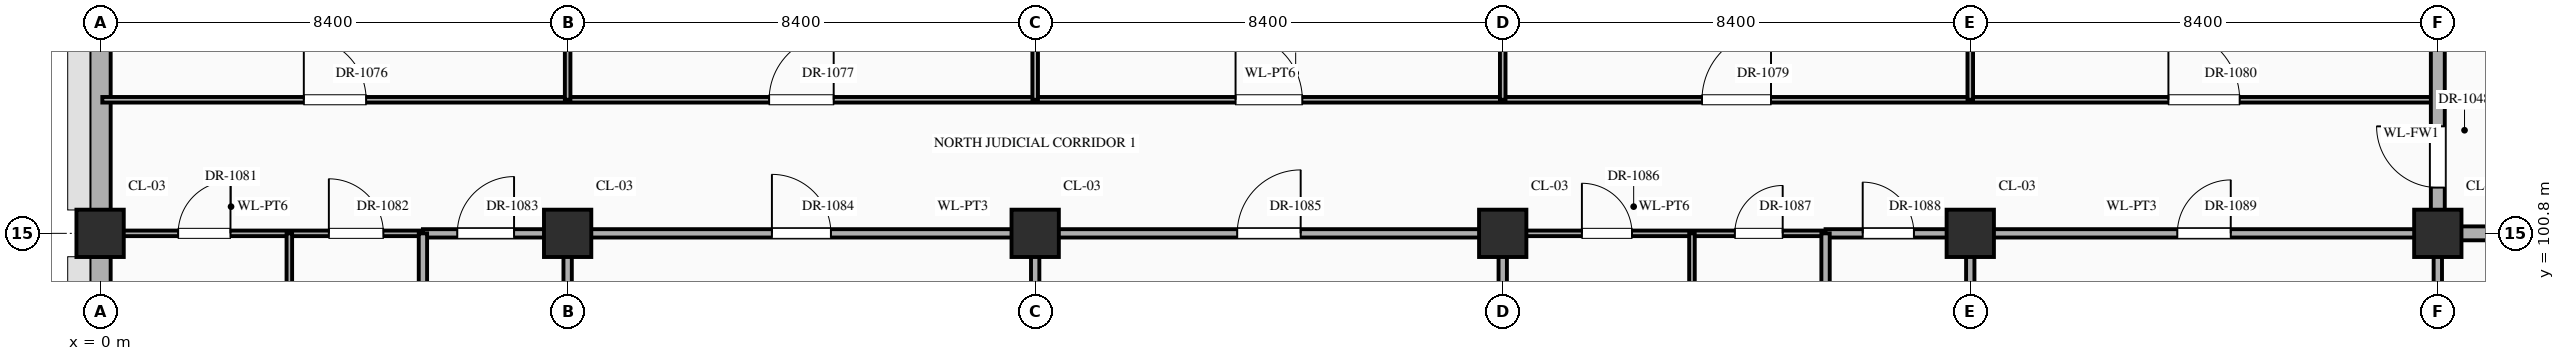
"""IFC4 building model, lengths in metres.
Left out: names, types, materials, properties, quantities, classifications, styles, units other than length and angle.
Written with IfcOpenShell. Run it as: python <this file> out.ifc"""

import sys

from ifc_helpers import new_model, si_unit, direction, frame, frame_2d, origin, origin_2d, place, context, subcontext, project, spatial, rectangle, extrude, element, fill, save


model = new_model("IFC4")
c1 = context("Model", 3, precision=1e-05, world=origin(), true_north=direction((0.0, 1.0)))
c2 = subcontext(c1, "Body", "Model", "MODEL_VIEW")
j1 = project(units=[si_unit("LENGTHUNIT", "METRE"), si_unit("PLANEANGLEUNIT", "RADIAN")], contexts=[c1])
p1 = place(None, origin())
s1 = spatial("IfcSite", under=j1, at=p1, CompositionType="ELEMENT")
p2 = place(p1, origin())
s2 = spatial("IfcBuilding", under=s1, at=p2, CompositionType="ELEMENT")
p3 = place(p2, frame((0.0, 0.0, 5.4)))
s3 = spatial("IfcBuildingStorey", under=s2, at=p3, CompositionType="ELEMENT", Elevation=5.4)
for number, where, z_axis, x_axis in (
    (1, (0.0, 100.8, 0.0), (0.0, 0.0, 1.0), (1.0, 0.0, 0.0)),
    (2, (8.4, 100.8, 0.0), (0.0, 0.0, 1.0), (1.0, 0.0, 0.0)),
    (3, (16.8, 100.8, 0.0), (0.0, 0.0, 1.0), (1.0, 0.0, 0.0)),
    (4, (25.2, 100.8, 0.0), (0.0, 0.0, 1.0), (1.0, 0.0, 0.0)),
    (5, (33.6, 100.8, 0.0), (0.0, 0.0, 1.0), (1.0, 0.0, 0.0)),
    (6, (42.0, 100.8, 0.0), (0.0, 0.0, 1.0), (1.0, 0.0, 0.0)),
):
    element("IfcColumn", number, at=place(p3, frame(where, z_axis=z_axis, x_axis=x_axis)), inside=s3, PredefinedType="COLUMN", context=c2, shape_type="SweptSolid", body=[
        extrude(rectangle(XDim=0.85, YDim=0.85, at=origin_2d()), origin(), (0.0, 0.0, 1.0), 5.4),
    ])
p4 = place(p3, frame((0.0, 94.02, 0.0), z_axis=(0.0, 0.0, 1.0), x_axis=(0.0, 1.0, 0.0)))
e7 = element("IfcWall", 7, at=p4, inside=s3, PredefinedType="STANDARD", context=c2, shape_type="SweptSolid", body=[
    extrude(rectangle(XDim=6.36, YDim=0.38, at=frame_2d((3.18, 0.0))), origin(), (0.0, 0.0, 1.0), 4.47),
])
p5 = place(p4, frame((3.705, 0.0, 0.85)))
e8 = element("IfcOpeningElement", 8, at=p5, cuts=e7, PredefinedType="OPENING", context=c2, shape_type="SweptSolid", body=[
    extrude(rectangle(XDim=1.55, YDim=1.74, at=frame_2d((0.775, 0.87))), frame((0.0, 0.202, 0.0), z_axis=(0.0, -1.0, 0.0), x_axis=(1.0, 0.0, 0.0)), (0.0, 0.0, 1.0), 0.404),
])
p6 = place(p3, frame((0.0, 101.22, 0.0), z_axis=(0.0, 0.0, 1.0), x_axis=(0.0, 1.0, 0.0)))
e9 = element("IfcWall", 9, at=p6, inside=s3, PredefinedType="STANDARD", context=c2, shape_type="SweptSolid", body=[
    extrude(rectangle(XDim=6.36, YDim=0.38, at=frame_2d((3.18, 0.0))), origin(), (0.0, 0.0, 1.0), 4.47),
])
p7 = place(p6, frame((3.705, 0.0, 0.85)))
e10 = element("IfcOpeningElement", 10, at=p7, cuts=e9, PredefinedType="OPENING", context=c2, shape_type="SweptSolid", body=[
    extrude(rectangle(XDim=1.55, YDim=1.92, at=frame_2d((0.775, 0.96))), frame((0.0, 0.202, 0.0), z_axis=(0.0, -1.0, 0.0), x_axis=(1.0, 0.0, 0.0)), (0.0, 0.0, 1.0), 0.404),
])
p8 = place(p3, frame((0.04, 100.8, 0.0), z_axis=(0.0, 0.0, 1.0), x_axis=(1.0, 0.0, 0.0)))
e11 = element("IfcWall", 11, at=p8, inside=s3, PredefinedType="STANDARD", context=c2, shape_type="SweptSolid", body=[
    extrude(rectangle(XDim=5.76, YDim=0.1, at=frame_2d((2.88, 0.0))), origin(), (0.0, 0.0, 1.0), 4.27),
])
p9 = place(p8, frame((1.363, 0.0, 0.0)))
e12 = element("IfcOpeningElement", 12, at=p9, cuts=e11, PredefinedType="OPENING", context=c2, shape_type="SweptSolid", body=[
    extrude(rectangle(XDim=0.94, YDim=2.3, at=frame_2d((0.47, 1.15))), frame((0.0, 0.062, 0.0), z_axis=(0.0, -1.0, 0.0), x_axis=(1.0, 0.0, 0.0)), (0.0, 0.0, 1.0), 0.124),
])
p10 = place(p8, frame((4.07, 0.0, 0.0)))
e13 = element("IfcOpeningElement", 13, at=p10, cuts=e11, PredefinedType="OPENING", context=c2, shape_type="SweptSolid", body=[
    extrude(rectangle(XDim=0.98, YDim=2.35, at=frame_2d((0.49, 1.175))), frame((0.0, 0.062, 0.0), z_axis=(0.0, -1.0, 0.0), x_axis=(1.0, 0.0, 0.0)), (0.0, 0.0, 1.0), 0.124),
])
p11 = place(p3, frame((5.8, 100.8, 0.0), z_axis=(0.0, 0.0, 1.0), x_axis=(1.0, 0.0, 0.0)))
e14 = element("IfcWall", 14, at=p11, inside=s3, PredefinedType="STANDARD", context=c2, shape_type="SweptSolid", body=[
    extrude(rectangle(XDim=19.4, YDim=0.15, at=frame_2d((9.7, 0.0))), origin(), (0.0, 0.0, 1.0), 4.27),
])
p12 = place(p11, frame((0.617, 0.0, 0.0)))
e15 = element("IfcOpeningElement", 15, at=p12, cuts=e14, PredefinedType="OPENING", context=c2, shape_type="SweptSolid", body=[
    extrude(rectangle(XDim=1.02, YDim=2.4, at=frame_2d((0.51, 1.2))), frame((0.0, 0.087, 0.0), z_axis=(0.0, -1.0, 0.0), x_axis=(1.0, 0.0, 0.0)), (0.0, 0.0, 1.0), 0.174),
])
p13 = place(p11, frame((6.27, 0.0, 0.0)))
e16 = element("IfcOpeningElement", 16, at=p13, cuts=e14, PredefinedType="OPENING", context=c2, shape_type="SweptSolid", body=[
    extrude(rectangle(XDim=1.06, YDim=2.4, at=frame_2d((0.53, 1.2))), frame((0.0, 0.087, 0.0), z_axis=(0.0, -1.0, 0.0), x_axis=(1.0, 0.0, 0.0)), (0.0, 0.0, 1.0), 0.174),
])
p14 = place(p11, frame((14.63, 0.0, 0.0)))
e17 = element("IfcOpeningElement", 17, at=p14, cuts=e14, PredefinedType="OPENING", context=c2, shape_type="SweptSolid", body=[
    extrude(rectangle(XDim=1.14, YDim=2.4, at=frame_2d((0.57, 1.2))), frame((0.0, 0.087, 0.0), z_axis=(0.0, -1.0, 0.0), x_axis=(1.0, 0.0, 0.0)), (0.0, 0.0, 1.0), 0.174),
])
p15 = place(p3, frame((25.2, 100.8, 0.0), z_axis=(0.0, 0.0, 1.0), x_axis=(1.0, 0.0, 0.0)))
e18 = element("IfcWall", 18, at=p15, inside=s3, PredefinedType="STANDARD", context=c2, shape_type="SweptSolid", body=[
    extrude(rectangle(XDim=5.8, YDim=0.1, at=frame_2d((2.9, 0.0))), origin(), (0.0, 0.0, 1.0), 4.27),
])
p16 = place(p15, frame((1.423, 0.0, 0.0)))
e19 = element("IfcOpeningElement", 19, at=p16, cuts=e18, PredefinedType="OPENING", context=c2, shape_type="SweptSolid", body=[
    extrude(rectangle(XDim=0.9, YDim=2.15, at=frame_2d((0.45, 1.075))), frame((0.0, 0.062, 0.0), z_axis=(0.0, -1.0, 0.0), x_axis=(1.0, 0.0, 0.0)), (0.0, 0.0, 1.0), 0.124),
])
p17 = place(p15, frame((4.17, 0.0, 0.0)))
e20 = element("IfcOpeningElement", 20, at=p17, cuts=e18, PredefinedType="OPENING", context=c2, shape_type="SweptSolid", body=[
    extrude(rectangle(XDim=0.86, YDim=2.1, at=frame_2d((0.43, 1.05))), frame((0.0, 0.062, 0.0), z_axis=(0.0, -1.0, 0.0), x_axis=(1.0, 0.0, 0.0)), (0.0, 0.0, 1.0), 0.124),
])
p18 = place(p3, frame((31.0, 100.8, 0.0), z_axis=(0.0, 0.0, 1.0), x_axis=(1.0, 0.0, 0.0)))
e21 = element("IfcWall", 21, at=p18, inside=s3, PredefinedType="STANDARD", context=c2, shape_type="SweptSolid", body=[
    extrude(rectangle(XDim=11.0, YDim=0.15, at=frame_2d((5.5, 0.0))), origin(), (0.0, 0.0, 1.0), 4.27),
])
p19 = place(p18, frame((0.667, 0.0, 0.0)))
e22 = element("IfcOpeningElement", 22, at=p19, cuts=e21, PredefinedType="OPENING", context=c2, shape_type="SweptSolid", body=[
    extrude(rectangle(XDim=0.92, YDim=2.15, at=frame_2d((0.46, 1.075))), frame((0.0, 0.087, 0.0), z_axis=(0.0, -1.0, 0.0), x_axis=(1.0, 0.0, 0.0)), (0.0, 0.0, 1.0), 0.174),
])
p20 = place(p18, frame((6.32, 0.0, 0.0)))
e23 = element("IfcOpeningElement", 23, at=p20, cuts=e21, PredefinedType="OPENING", context=c2, shape_type="SweptSolid", body=[
    extrude(rectangle(XDim=0.96, YDim=2.2, at=frame_2d((0.48, 1.1))), frame((0.0, 0.087, 0.0), z_axis=(0.0, -1.0, 0.0), x_axis=(1.0, 0.0, 0.0)), (0.0, 0.0, 1.0), 0.174),
])
p21 = place(p3, frame((42.0, 100.8, 0.0), z_axis=(0.0, 0.0, 1.0), x_axis=(1.0, 0.0, 0.0)))
e24 = element("IfcWall", 24, at=p21, inside=s3, PredefinedType="STANDARD", context=c2, shape_type="SweptSolid", body=[
    extrude(rectangle(XDim=4.2, YDim=0.25, at=frame_2d((2.1, 0.0))), origin(), (0.0, 0.0, 1.0), 4.27),
])
p22 = place(p3, frame((0.04, 103.2, 0.0), z_axis=(0.0, 0.0, 1.0), x_axis=(1.0, 0.0, 0.0)))
e25 = element("IfcWall", 25, at=p22, inside=s3, PredefinedType="STANDARD", context=c2, shape_type="SweptSolid", body=[
    extrude(rectangle(XDim=41.96, YDim=0.1, at=frame_2d((20.98, 0.0))), origin(), (0.0, 0.0, 1.0), 5.12),
])
p23 = place(p22, frame((3.62, 0.0, 0.0)))
e26 = element("IfcOpeningElement", 26, at=p23, cuts=e25, PredefinedType="OPENING", context=c2, shape_type="SweptSolid", body=[
    extrude(rectangle(XDim=1.12, YDim=2.25, at=frame_2d((0.56, 1.125))), frame((0.0, 0.062, 0.0), z_axis=(0.0, -1.0, 0.0), x_axis=(1.0, 0.0, 0.0)), (0.0, 0.0, 1.0), 0.124),
])
p24 = place(p22, frame((11.98, 0.0, 0.0)))
e27 = element("IfcOpeningElement", 27, at=p24, cuts=e25, PredefinedType="OPENING", context=c2, shape_type="SweptSolid", body=[
    extrude(rectangle(XDim=1.16, YDim=2.3, at=frame_2d((0.58, 1.15))), frame((0.0, 0.062, 0.0), z_axis=(0.0, -1.0, 0.0), x_axis=(1.0, 0.0, 0.0)), (0.0, 0.0, 1.0), 0.124),
])
p25 = place(p22, frame((20.36, 0.0, 0.0)))
e28 = element("IfcOpeningElement", 28, at=p25, cuts=e25, PredefinedType="OPENING", context=c2, shape_type="SweptSolid", body=[
    extrude(rectangle(XDim=1.2, YDim=2.35, at=frame_2d((0.6, 1.175))), frame((0.0, 0.062, 0.0), z_axis=(0.0, -1.0, 0.0), x_axis=(1.0, 0.0, 0.0)), (0.0, 0.0, 1.0), 0.124),
])
p26 = place(p22, frame((28.74, 0.0, 0.0)))
e29 = element("IfcOpeningElement", 29, at=p26, cuts=e25, PredefinedType="OPENING", context=c2, shape_type="SweptSolid", body=[
    extrude(rectangle(XDim=1.24, YDim=2.3, at=frame_2d((0.62, 1.15))), frame((0.0, 0.062, 0.0), z_axis=(0.0, -1.0, 0.0), x_axis=(1.0, 0.0, 0.0)), (0.0, 0.0, 1.0), 0.124),
])
p27 = place(p22, frame((37.12, 0.0, 0.0)))
e30 = element("IfcOpeningElement", 30, at=p27, cuts=e25, PredefinedType="OPENING", context=c2, shape_type="SweptSolid", body=[
    extrude(rectangle(XDim=1.28, YDim=2.35, at=frame_2d((0.64, 1.175))), frame((0.0, 0.062, 0.0), z_axis=(0.0, -1.0, 0.0), x_axis=(1.0, 0.0, 0.0)), (0.0, 0.0, 1.0), 0.124),
])
p28 = place(p3, frame((3.4, 96.0, 0.0), z_axis=(0.0, 0.0, 1.0), x_axis=(0.0, 1.0, 0.0)))
e31 = element("IfcWall", 31, at=p28, inside=s3, PredefinedType="STANDARD", context=c2, shape_type="SweptSolid", body=[
    extrude(rectangle(XDim=4.8, YDim=0.1, at=frame_2d((2.4, 0.0))), origin(), (0.0, 0.0, 1.0), 5.12),
])
p29 = place(p28, frame((1.76, 0.0, 0.0)))
e32 = element("IfcOpeningElement", 32, at=p29, cuts=e31, PredefinedType="OPENING", context=c2, shape_type="SweptSolid", body=[
    extrude(rectangle(XDim=1.28, YDim=2.35, at=frame_2d((0.64, 1.175))), frame((0.0, 0.062, 0.0), z_axis=(0.0, -1.0, 0.0), x_axis=(1.0, 0.0, 0.0)), (0.0, 0.0, 1.0), 0.124),
])
p30 = place(p3, frame((5.8, 96.0, 0.0), z_axis=(0.0, 0.0, 1.0), x_axis=(0.0, 1.0, 0.0)))
e33 = element("IfcWall", 33, at=p30, inside=s3, PredefinedType="STANDARD", context=c2, shape_type="SweptSolid", body=[
    extrude(rectangle(XDim=4.8, YDim=0.15, at=frame_2d((2.4, 0.0))), origin(), (0.0, 0.0, 1.0), 5.12),
])
p31 = place(p30, frame((1.93, 0.0, 0.0)))
e34 = element("IfcOpeningElement", 34, at=p31, cuts=e33, PredefinedType="OPENING", context=c2, shape_type="SweptSolid", body=[
    extrude(rectangle(XDim=0.94, YDim=2.3, at=frame_2d((0.47, 1.15))), frame((0.0, 0.087, 0.0), z_axis=(0.0, -1.0, 0.0), x_axis=(1.0, 0.0, 0.0)), (0.0, 0.0, 1.0), 0.174),
])
p32 = place(p3, frame((8.4, 96.0, 0.0), z_axis=(0.0, 0.0, 1.0), x_axis=(0.0, 1.0, 0.0)))
e35 = element("IfcWall", 35, at=p32, inside=s3, PredefinedType="STANDARD", context=c2, shape_type="SweptSolid", body=[
    extrude(rectangle(XDim=4.8, YDim=0.15, at=frame_2d((2.4, 0.0))), origin(), (0.0, 0.0, 1.0), 4.37),
])
p33 = place(p3, frame((8.4, 103.2, 0.0), z_axis=(0.0, 0.0, 1.0), x_axis=(0.0, 1.0, 0.0)))
e36 = element("IfcWall", 36, at=p33, inside=s3, PredefinedType="STANDARD", context=c2, shape_type="SweptSolid", body=[
    extrude(rectangle(XDim=4.76, YDim=0.1, at=frame_2d((2.38, 0.0))), origin(), (0.0, 0.0, 1.0), 4.37),
])
p34 = place(p3, frame((16.8, 96.0, 0.0), z_axis=(0.0, 0.0, 1.0), x_axis=(0.0, 1.0, 0.0)))
e37 = element("IfcWall", 37, at=p34, inside=s3, PredefinedType="STANDARD", context=c2, shape_type="SweptSolid", body=[
    extrude(rectangle(XDim=4.8, YDim=0.15, at=frame_2d((2.4, 0.0))), origin(), (0.0, 0.0, 1.0), 4.37),
])
p35 = place(p3, frame((16.8, 103.2, 0.0), z_axis=(0.0, 0.0, 1.0), x_axis=(0.0, 1.0, 0.0)))
e38 = element("IfcWall", 38, at=p35, inside=s3, PredefinedType="STANDARD", context=c2, shape_type="SweptSolid", body=[
    extrude(rectangle(XDim=4.76, YDim=0.1, at=frame_2d((2.38, 0.0))), origin(), (0.0, 0.0, 1.0), 4.37),
])
p36 = place(p3, frame((25.2, 96.0, 0.0), z_axis=(0.0, 0.0, 1.0), x_axis=(0.0, 1.0, 0.0)))
e39 = element("IfcWall", 39, at=p36, inside=s3, PredefinedType="STANDARD", context=c2, shape_type="SweptSolid", body=[
    extrude(rectangle(XDim=4.8, YDim=0.15, at=frame_2d((2.4, 0.0))), origin(), (0.0, 0.0, 1.0), 4.37),
])
p37 = place(p3, frame((25.2, 103.2, 0.0), z_axis=(0.0, 0.0, 1.0), x_axis=(0.0, 1.0, 0.0)))
e40 = element("IfcWall", 40, at=p37, inside=s3, PredefinedType="STANDARD", context=c2, shape_type="SweptSolid", body=[
    extrude(rectangle(XDim=4.76, YDim=0.1, at=frame_2d((2.38, 0.0))), origin(), (0.0, 0.0, 1.0), 4.37),
])
p38 = place(p3, frame((28.6, 96.0, 0.0), z_axis=(0.0, 0.0, 1.0), x_axis=(0.0, 1.0, 0.0)))
e41 = element("IfcWall", 41, at=p38, inside=s3, PredefinedType="STANDARD", context=c2, shape_type="SweptSolid", body=[
    extrude(rectangle(XDim=4.8, YDim=0.1, at=frame_2d((2.4, 0.0))), origin(), (0.0, 0.0, 1.0), 5.12),
])
p39 = place(p38, frame((1.91, 0.0, 0.0)))
e42 = element("IfcOpeningElement", 42, at=p39, cuts=e41, PredefinedType="OPENING", context=c2, shape_type="SweptSolid", body=[
    extrude(rectangle(XDim=0.98, YDim=2.35, at=frame_2d((0.49, 1.175))), frame((0.0, 0.062, 0.0), z_axis=(0.0, -1.0, 0.0), x_axis=(1.0, 0.0, 0.0)), (0.0, 0.0, 1.0), 0.124),
])
p40 = place(p3, frame((31.0, 96.0, 0.0), z_axis=(0.0, 0.0, 1.0), x_axis=(0.0, 1.0, 0.0)))
e43 = element("IfcWall", 43, at=p40, inside=s3, PredefinedType="STANDARD", context=c2, shape_type="SweptSolid", body=[
    extrude(rectangle(XDim=4.8, YDim=0.15, at=frame_2d((2.4, 0.0))), origin(), (0.0, 0.0, 1.0), 5.12),
])
p41 = place(p40, frame((1.89, 0.0, 0.0)))
e44 = element("IfcOpeningElement", 44, at=p41, cuts=e43, PredefinedType="OPENING", context=c2, shape_type="SweptSolid", body=[
    extrude(rectangle(XDim=1.02, YDim=2.4, at=frame_2d((0.51, 1.2))), frame((0.0, 0.087, 0.0), z_axis=(0.0, -1.0, 0.0), x_axis=(1.0, 0.0, 0.0)), (0.0, 0.0, 1.0), 0.174),
])
p42 = place(p3, frame((33.6, 96.0, 0.0), z_axis=(0.0, 0.0, 1.0), x_axis=(0.0, 1.0, 0.0)))
e45 = element("IfcWall", 45, at=p42, inside=s3, PredefinedType="STANDARD", context=c2, shape_type="SweptSolid", body=[
    extrude(rectangle(XDim=4.8, YDim=0.15, at=frame_2d((2.4, 0.0))), origin(), (0.0, 0.0, 1.0), 4.37),
])
p43 = place(p3, frame((33.6, 103.2, 0.0), z_axis=(0.0, 0.0, 1.0), x_axis=(0.0, 1.0, 0.0)))
e46 = element("IfcWall", 46, at=p43, inside=s3, PredefinedType="STANDARD", context=c2, shape_type="SweptSolid", body=[
    extrude(rectangle(XDim=4.76, YDim=0.1, at=frame_2d((2.38, 0.0))), origin(), (0.0, 0.0, 1.0), 4.37),
])
p44 = place(p3, frame((42.0, 96.0, 0.0), z_axis=(0.0, 0.0, 1.0), x_axis=(0.0, 1.0, 0.0)))
e47 = element("IfcWall", 47, at=p44, inside=s3, PredefinedType="STANDARD", context=c2, shape_type="SweptSolid", body=[
    extrude(rectangle(XDim=4.8, YDim=0.15, at=frame_2d((2.4, 0.0))), origin(), (0.0, 0.0, 1.0), 4.37),
])
p45 = place(p3, frame((42.0, 100.8, 0.0), z_axis=(0.0, 0.0, 1.0), x_axis=(0.0, 1.0, 0.0)))
e48 = element("IfcWall", 48, at=p45, inside=s3, PredefinedType="STANDARD", context=c2, shape_type="SweptSolid", body=[
    extrude(rectangle(XDim=3.6, YDim=0.25, at=frame_2d((1.8, 0.0))), origin(), (0.0, 0.0, 1.0), 4.37),
])
p46 = place(p45, frame((0.823, 0.0, 0.0)))
e49 = element("IfcOpeningElement", 49, at=p46, cuts=e48, PredefinedType="OPENING", context=c2, shape_type="SweptSolid", body=[
    extrude(rectangle(XDim=1.1, YDim=2.2, at=frame_2d((0.55, 1.1))), frame((0.0, 0.137, 0.0), z_axis=(0.0, -1.0, 0.0), x_axis=(1.0, 0.0, 0.0)), (0.0, 0.0, 1.0), 0.274),
])
p47 = place(p46, origin())
e50 = element("IfcDoor", 50, at=p47, inside=s3, OperationType="SINGLE_SWING_RIGHT", PredefinedType="DOOR", context=c2, shape_type="SweptSolid", body=[
    extrude(rectangle(XDim=1.1, YDim=2.2, at=frame_2d((0.55, 1.1))), frame((0.0, 0.025, 0.0), z_axis=(0.0, -1.0, 0.0), x_axis=(1.0, 0.0, 0.0)), (0.0, 0.0, 1.0), 0.05),
])
fill(e49, e50)
p48 = place(p23, origin())
e51 = element("IfcDoor", 51, at=p48, inside=s3, OperationType="SINGLE_SWING_LEFT", PredefinedType="DOOR", context=c2, shape_type="SweptSolid", body=[
    extrude(rectangle(XDim=1.12, YDim=2.25, at=frame_2d((0.56, 1.125))), frame((0.0, 0.025, 0.0), z_axis=(0.0, -1.0, 0.0), x_axis=(1.0, 0.0, 0.0)), (0.0, 0.0, 1.0), 0.05),
])
fill(e26, e51)
p49 = place(p24, origin())
e52 = element("IfcDoor", 52, at=p49, inside=s3, OperationType="SINGLE_SWING_RIGHT", PredefinedType="DOOR", context=c2, shape_type="SweptSolid", body=[
    extrude(rectangle(XDim=1.16, YDim=2.3, at=frame_2d((0.58, 1.15))), frame((0.0, 0.025, 0.0), z_axis=(0.0, -1.0, 0.0), x_axis=(1.0, 0.0, 0.0)), (0.0, 0.0, 1.0), 0.05),
])
fill(e27, e52)
p50 = place(p25, origin())
e53 = element("IfcDoor", 53, at=p50, inside=s3, OperationType="SINGLE_SWING_LEFT", PredefinedType="DOOR", context=c2, shape_type="SweptSolid", body=[
    extrude(rectangle(XDim=1.2, YDim=2.35, at=frame_2d((0.6, 1.175))), frame((0.0, 0.025, 0.0), z_axis=(0.0, -1.0, 0.0), x_axis=(1.0, 0.0, 0.0)), (0.0, 0.0, 1.0), 0.05),
])
fill(e28, e53)
p51 = place(p26, origin())
e54 = element("IfcDoor", 54, at=p51, inside=s3, OperationType="SINGLE_SWING_RIGHT", PredefinedType="DOOR", context=c2, shape_type="SweptSolid", body=[
    extrude(rectangle(XDim=1.24, YDim=2.3, at=frame_2d((0.62, 1.15))), frame((0.0, 0.025, 0.0), z_axis=(0.0, -1.0, 0.0), x_axis=(1.0, 0.0, 0.0)), (0.0, 0.0, 1.0), 0.05),
])
fill(e29, e54)
p52 = place(p27, origin())
e55 = element("IfcDoor", 55, at=p52, inside=s3, OperationType="SINGLE_SWING_LEFT", PredefinedType="DOOR", context=c2, shape_type="SweptSolid", body=[
    extrude(rectangle(XDim=1.28, YDim=2.35, at=frame_2d((0.64, 1.175))), frame((0.0, 0.025, 0.0), z_axis=(0.0, -1.0, 0.0), x_axis=(1.0, 0.0, 0.0)), (0.0, 0.0, 1.0), 0.05),
])
fill(e30, e55)
p53 = place(p9, origin())
e56 = element("IfcDoor", 56, at=p53, inside=s3, OperationType="SINGLE_SWING_RIGHT", PredefinedType="DOOR", context=c2, shape_type="SweptSolid", body=[
    extrude(rectangle(XDim=0.94, YDim=2.3, at=frame_2d((0.47, 1.15))), frame((0.0, 0.025, 0.0), z_axis=(0.0, -1.0, 0.0), x_axis=(1.0, 0.0, 0.0)), (0.0, 0.0, 1.0), 0.05),
])
fill(e12, e56)
p54 = place(p10, origin())
e57 = element("IfcDoor", 57, at=p54, inside=s3, OperationType="SINGLE_SWING_LEFT", PredefinedType="DOOR", context=c2, shape_type="SweptSolid", body=[
    extrude(rectangle(XDim=0.98, YDim=2.35, at=frame_2d((0.49, 1.175))), frame((0.0, 0.025, 0.0), z_axis=(0.0, -1.0, 0.0), x_axis=(1.0, 0.0, 0.0)), (0.0, 0.0, 1.0), 0.05),
])
fill(e13, e57)
p55 = place(p12, origin())
e58 = element("IfcDoor", 58, at=p55, inside=s3, OperationType="SINGLE_SWING_RIGHT", PredefinedType="DOOR", context=c2, shape_type="SweptSolid", body=[
    extrude(rectangle(XDim=1.02, YDim=2.4, at=frame_2d((0.51, 1.2))), frame((0.0, 0.025, 0.0), z_axis=(0.0, -1.0, 0.0), x_axis=(1.0, 0.0, 0.0)), (0.0, 0.0, 1.0), 0.05),
])
fill(e15, e58)
p56 = place(p13, origin())
e59 = element("IfcDoor", 59, at=p56, inside=s3, OperationType="SINGLE_SWING_LEFT", PredefinedType="DOOR", context=c2, shape_type="SweptSolid", body=[
    extrude(rectangle(XDim=1.06, YDim=2.4, at=frame_2d((0.53, 1.2))), frame((0.0, 0.025, 0.0), z_axis=(0.0, -1.0, 0.0), x_axis=(1.0, 0.0, 0.0)), (0.0, 0.0, 1.0), 0.05),
])
fill(e16, e59)
p57 = place(p14, origin())
e60 = element("IfcDoor", 60, at=p57, inside=s3, OperationType="SINGLE_SWING_RIGHT", PredefinedType="DOOR", context=c2, shape_type="SweptSolid", body=[
    extrude(rectangle(XDim=1.14, YDim=2.4, at=frame_2d((0.57, 1.2))), frame((0.0, 0.025, 0.0), z_axis=(0.0, -1.0, 0.0), x_axis=(1.0, 0.0, 0.0)), (0.0, 0.0, 1.0), 0.05),
])
fill(e17, e60)
p58 = place(p16, origin())
e61 = element("IfcDoor", 61, at=p58, inside=s3, OperationType="SINGLE_SWING_LEFT", PredefinedType="DOOR", context=c2, shape_type="SweptSolid", body=[
    extrude(rectangle(XDim=0.9, YDim=2.15, at=frame_2d((0.45, 1.075))), frame((0.0, 0.025, 0.0), z_axis=(0.0, -1.0, 0.0), x_axis=(1.0, 0.0, 0.0)), (0.0, 0.0, 1.0), 0.05),
])
fill(e19, e61)
p59 = place(p17, origin())
e62 = element("IfcDoor", 62, at=p59, inside=s3, OperationType="SINGLE_SWING_RIGHT", PredefinedType="DOOR", context=c2, shape_type="SweptSolid", body=[
    extrude(rectangle(XDim=0.86, YDim=2.1, at=frame_2d((0.43, 1.05))), frame((0.0, 0.025, 0.0), z_axis=(0.0, -1.0, 0.0), x_axis=(1.0, 0.0, 0.0)), (0.0, 0.0, 1.0), 0.05),
])
fill(e20, e62)
p60 = place(p19, origin())
e63 = element("IfcDoor", 63, at=p60, inside=s3, OperationType="SINGLE_SWING_LEFT", PredefinedType="DOOR", context=c2, shape_type="SweptSolid", body=[
    extrude(rectangle(XDim=0.92, YDim=2.15, at=frame_2d((0.46, 1.075))), frame((0.0, 0.025, 0.0), z_axis=(0.0, -1.0, 0.0), x_axis=(1.0, 0.0, 0.0)), (0.0, 0.0, 1.0), 0.05),
])
fill(e22, e63)
p61 = place(p20, origin())
e64 = element("IfcDoor", 64, at=p61, inside=s3, OperationType="SINGLE_SWING_RIGHT", PredefinedType="DOOR", context=c2, shape_type="SweptSolid", body=[
    extrude(rectangle(XDim=0.96, YDim=2.2, at=frame_2d((0.48, 1.1))), frame((0.0, 0.025, 0.0), z_axis=(0.0, -1.0, 0.0), x_axis=(1.0, 0.0, 0.0)), (0.0, 0.0, 1.0), 0.05),
])
fill(e23, e64)
save(model, sys.argv[1])
